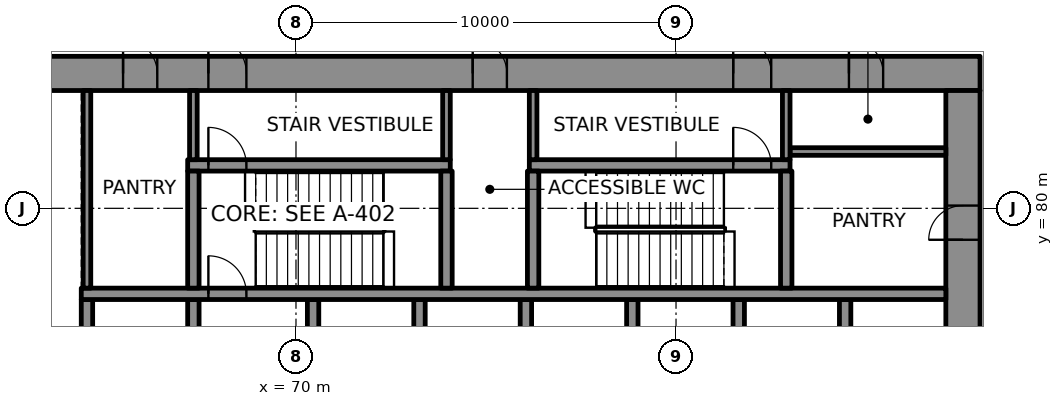
"""IFC4 building model, lengths in metres.
Left out: names, types, materials, properties, quantities, classifications, styles, units other than length and angle.
Written with IfcOpenShell. Run it as: python <this file> out.ifc"""

import sys

from ifc_helpers import new_model, si_unit, direction, frame, frame_2d, origin, place, context, subcontext, project, spatial, rectangle, extrude, element, fill, save


model = new_model("IFC4")
c1 = context("Model", 3, precision=1e-05, world=origin(), true_north=direction((0.0, 1.0)))
c2 = subcontext(c1, "Body", "Model", "MODEL_VIEW")
j1 = project(units=[si_unit("LENGTHUNIT", "METRE"), si_unit("PLANEANGLEUNIT", "RADIAN")], contexts=[c1])
p1 = place(None, origin())
s1 = spatial("IfcSite", under=j1, at=p1, CompositionType="ELEMENT")
p2 = place(p1, origin())
s2 = spatial("IfcBuilding", under=s1, at=p2, CompositionType="ELEMENT")
p3 = place(p2, frame((0.0, 0.0, 21.8)))
s3 = spatial("IfcBuildingStorey", under=s2, at=p3, CompositionType="ELEMENT", Elevation=21.8)
p4 = place(p3, frame((62.0, 83.55, 0.0), z_axis=(0.0, 0.0, 1.0), x_axis=(1.0, 0.0, 0.0)))
e1 = element("IfcWall", 1, at=p4, inside=s3, PredefinedType="SHEAR", context=c2, shape_type="SweptSolid", body=[
    extrude(rectangle(XDim=26.0, YDim=0.9, at=frame_2d((13.0, 0.0))), origin(), (0.0, 0.0, 1.0), 4.3),
])
p5 = place(p4, frame((5.695, 0.0, 0.0)))
e2 = element("IfcOpeningElement", 2, at=p5, cuts=e1, PredefinedType="OPENING", context=c2, shape_type="SweptSolid", body=[
    extrude(rectangle(XDim=1.0, YDim=2.1, at=frame_2d((0.5, 1.05))), frame((0.0, 0.46, 0.0), z_axis=(0.0, -1.0, 0.0), x_axis=(1.0, 0.0, 0.0)), (0.0, 0.0, 1.0), 0.92),
])
p6 = place(p4, frame((19.505, 0.0, 0.0)))
e3 = element("IfcOpeningElement", 3, at=p6, cuts=e1, PredefinedType="OPENING", context=c2, shape_type="SweptSolid", body=[
    extrude(rectangle(XDim=1.0, YDim=2.1, at=frame_2d((0.5, 1.05))), frame((0.0, 0.46, 0.0), z_axis=(0.0, -1.0, 0.0), x_axis=(1.0, 0.0, 0.0)), (0.0, 0.0, 1.0), 0.92),
])
p7 = place(p4, frame((3.45, 0.0, 0.0)))
e4 = element("IfcOpeningElement", 4, at=p7, cuts=e1, PredefinedType="OPENING", context=c2, shape_type="SweptSolid", body=[
    extrude(rectangle(XDim=0.9, YDim=2.1, at=frame_2d((0.45, 1.05))), frame((0.0, 0.46, 0.0), z_axis=(0.0, -1.0, 0.0), x_axis=(1.0, 0.0, 0.0)), (0.0, 0.0, 1.0), 0.92),
])
p8 = place(p4, frame((12.65, 0.0, 0.0)))
e5 = element("IfcOpeningElement", 5, at=p8, cuts=e1, PredefinedType="OPENING", context=c2, shape_type="SweptSolid", body=[
    extrude(rectangle(XDim=0.9, YDim=2.1, at=frame_2d((0.45, 1.05))), frame((0.0, 0.46, 0.0), z_axis=(0.0, -1.0, 0.0), x_axis=(1.0, 0.0, 0.0)), (0.0, 0.0, 1.0), 0.92),
])
p9 = place(p4, frame((22.55, 0.0, 0.0)))
e6 = element("IfcOpeningElement", 6, at=p9, cuts=e1, PredefinedType="OPENING", context=c2, shape_type="SweptSolid", body=[
    extrude(rectangle(XDim=0.9, YDim=2.1, at=frame_2d((0.45, 1.05))), frame((0.0, 0.46, 0.0), z_axis=(0.0, -1.0, 0.0), x_axis=(1.0, 0.0, 0.0)), (0.0, 0.0, 1.0), 0.92),
])
p10 = place(p3, frame((87.55, 66.9, 0.0), z_axis=(0.0, 0.0, 1.0), x_axis=(0.0, 1.0, 0.0)))
e7 = element("IfcWall", 7, at=p10, inside=s3, PredefinedType="SHEAR", context=c2, shape_type="SweptSolid", body=[
    extrude(rectangle(XDim=16.2, YDim=0.9, at=frame_2d((8.1, 0.0))), origin(), (0.0, 0.0, 1.0), 4.3),
])
p11 = place(p10, frame((5.5, 0.0, 0.0)))
e8 = element("IfcOpeningElement", 8, at=p11, cuts=e7, PredefinedType="OPENING", context=c2, shape_type="SweptSolid", body=[
    extrude(rectangle(XDim=1.8, YDim=2.1, at=frame_2d((0.9, 1.05))), frame((0.0, 0.46, 0.0), z_axis=(0.0, -1.0, 0.0), x_axis=(1.0, 0.0, 0.0)), (0.0, 0.0, 1.0), 0.92),
])
p12 = place(p10, frame((12.272, 0.0, 0.0)))
e9 = element("IfcOpeningElement", 9, at=p12, cuts=e7, PredefinedType="OPENING", context=c2, shape_type="SweptSolid", body=[
    extrude(rectangle(XDim=0.9, YDim=2.1, at=frame_2d((0.45, 1.05))), frame((0.0, 0.46, 0.0), z_axis=(0.0, -1.0, 0.0), x_axis=(1.0, 0.0, 0.0)), (0.0, 0.0, 1.0), 0.92),
])
for number, where, z_axis, x_axis in (
    (10, (64.5, 75.0, 0.0), (0.0, 0.0, 1.0), (0.0, 1.0, 0.0)),
    (11, (67.3, 75.0, 0.0), (0.0, 0.0, 1.0), (0.0, 1.0, 0.0)),
):
    element("IfcWall", number, at=place(p3, frame(where, z_axis=z_axis, x_axis=x_axis)), inside=s3, PredefinedType="SHEAR", context=c2, shape_type="SweptSolid", body=[
        extrude(rectangle(XDim=2.6, YDim=0.3, at=frame_2d((1.3, 0.0))), origin(), (0.0, 0.0, 1.0), 4.3),
    ])
p13 = place(p3, frame((70.45, 75.0, 0.0), z_axis=(0.0, 0.0, 1.0), x_axis=(0.0, 1.0, 0.0)))
e12 = element("IfcWall", 12, at=p13, inside=s3, PredefinedType="SHEAR", context=c2, shape_type="SweptSolid", body=[
    extrude(rectangle(XDim=2.6, YDim=0.3, at=frame_2d((1.3, 0.0))), origin(), (0.0, 0.0, 1.0), 4.3),
])
p14 = place(p13, frame((0.15, 0.0, 0.0)))
e13 = element("IfcOpeningElement", 13, at=p14, cuts=e12, PredefinedType="OPENING", context=c2, shape_type="SweptSolid", body=[
    extrude(rectangle(XDim=1.1, YDim=2.1, at=frame_2d((0.55, 1.05))), frame((0.0, 0.16, 0.0), z_axis=(0.0, -1.0, 0.0), x_axis=(1.0, 0.0, 0.0)), (0.0, 0.0, 1.0), 0.32),
])
for number, where, z_axis, x_axis in (
    (14, (73.25, 75.0, 0.0), (0.0, 0.0, 1.0), (0.0, 1.0, 0.0)),
    (15, (76.05, 75.0, 0.0), (0.0, 0.0, 1.0), (0.0, 1.0, 0.0)),
    (16, (78.85, 75.0, 0.0), (0.0, 0.0, 1.0), (0.0, 1.0, 0.0)),
    (17, (81.65, 75.0, 0.0), (0.0, 0.0, 1.0), (0.0, 1.0, 0.0)),
    (18, (84.45, 75.0, 0.0), (0.0, 0.0, 1.0), (0.0, 1.0, 0.0)),
):
    element("IfcWall", number, at=place(p3, frame(where, z_axis=z_axis, x_axis=x_axis)), inside=s3, PredefinedType="SHEAR", context=c2, shape_type="SweptSolid", body=[
        extrude(rectangle(XDim=2.6, YDim=0.3, at=frame_2d((1.3, 0.0))), origin(), (0.0, 0.0, 1.0), 4.3),
    ])
p15 = place(p3, frame((64.35, 77.75, 0.0), z_axis=(0.0, 0.0, 1.0), x_axis=(1.0, 0.0, 0.0)))
e19 = element("IfcWall", 19, at=p15, inside=s3, PredefinedType="SHEAR", context=c2, shape_type="SweptSolid", body=[
    extrude(rectangle(XDim=22.75, YDim=0.3, at=frame_2d((11.375, 0.0))), origin(), (0.0, 0.0, 1.0), 4.3),
])
p16 = place(p15, frame((3.345, 0.0, 0.0)))
e20 = element("IfcOpeningElement", 20, at=p16, cuts=e19, PredefinedType="OPENING", context=c2, shape_type="SweptSolid", body=[
    extrude(rectangle(XDim=1.0, YDim=2.1, at=frame_2d((0.5, 1.05))), frame((0.0, 0.16, 0.0), z_axis=(0.0, -1.0, 0.0), x_axis=(1.0, 0.0, 0.0)), (0.0, 0.0, 1.0), 0.32),
])
p17 = place(p3, frame((67.15, 81.13, 0.0), z_axis=(0.0, 0.0, 1.0), x_axis=(1.0, 0.0, 0.0)))
e21 = element("IfcWall", 21, at=p17, inside=s3, PredefinedType="SHEAR", context=c2, shape_type="SweptSolid", body=[
    extrude(rectangle(XDim=6.91, YDim=0.3, at=frame_2d((3.455, 0.0))), origin(), (0.0, 0.0, 1.0), 4.3),
])
p18 = place(p17, frame((0.545, 0.0, 0.0)))
e22 = element("IfcOpeningElement", 22, at=p18, cuts=e21, PredefinedType="OPENING", context=c2, shape_type="SweptSolid", body=[
    extrude(rectangle(XDim=1.0, YDim=2.1, at=frame_2d((0.5, 1.05))), frame((0.0, 0.16, 0.0), z_axis=(0.0, -1.0, 0.0), x_axis=(1.0, 0.0, 0.0)), (0.0, 0.0, 1.0), 0.32),
])
p19 = place(p3, frame((76.14, 81.13, 0.0), z_axis=(0.0, 0.0, 1.0), x_axis=(1.0, 0.0, 0.0)))
e23 = element("IfcWall", 23, at=p19, inside=s3, PredefinedType="SHEAR", context=c2, shape_type="SweptSolid", body=[
    extrude(rectangle(XDim=6.86, YDim=0.3, at=frame_2d((3.43, 0.0))), origin(), (0.0, 0.0, 1.0), 4.3),
])
p20 = place(p19, frame((5.365, 0.0, 0.0)))
e24 = element("IfcOpeningElement", 24, at=p20, cuts=e23, PredefinedType="OPENING", context=c2, shape_type="SweptSolid", body=[
    extrude(rectangle(XDim=1.0, YDim=2.1, at=frame_2d((0.5, 1.05))), frame((0.0, 0.16, 0.0), z_axis=(0.0, -1.0, 0.0), x_axis=(1.0, 0.0, 0.0)), (0.0, 0.0, 1.0), 0.32),
])
for number, where, z_axis, x_axis in (
    (25, (67.3, 77.9, 0.0), (0.0, 0.0, 1.0), (0.0, 1.0, 0.0)),
    (26, (73.96, 77.9, 0.0), (0.0, 0.0, 1.0), (0.0, 1.0, 0.0)),
    (27, (76.24, 77.9, 0.0), (0.0, 0.0, 1.0), (0.0, 1.0, 0.0)),
    (28, (82.9, 77.9, 0.0), (0.0, 0.0, 1.0), (0.0, 1.0, 0.0)),
):
    element("IfcWall", number, at=place(p3, frame(where, z_axis=z_axis, x_axis=x_axis)), inside=s3, PredefinedType="SHEAR", context=c2, shape_type="SweptSolid", body=[
        extrude(rectangle(XDim=3.08, YDim=0.3, at=frame_2d((1.54, 0.0))), origin(), (0.0, 0.0, 1.0), 4.3),
    ])
p21 = place(p3, frame((83.0, 81.495, 0.0), z_axis=(0.0, 0.0, 1.0), x_axis=(1.0, 0.0, 0.0)))
e29 = element("IfcWall", 29, at=p21, inside=s3, PredefinedType="PARTITIONING", context=c2, shape_type="SweptSolid", body=[
    extrude(rectangle(XDim=4.1, YDim=0.2, at=frame_2d((2.05, 0.0))), origin(), (0.0, 0.0, 1.0), 4.3),
])
p22 = place(p3, frame((64.5, 77.9, 0.0), z_axis=(0.0, 0.0, 1.0), x_axis=(0.0, 1.0, 0.0)))
e30 = element("IfcWall", 30, at=p22, inside=s3, PredefinedType="PARTITIONING", context=c2, shape_type="SweptSolid", body=[
    extrude(rectangle(XDim=5.2, YDim=0.2, at=frame_2d((2.6, 0.0))), origin(), (0.0, 0.0, 1.0), 4.3),
])
for number, where, z_axis, x_axis in (
    (31, (67.3, 81.28, 0.0), (0.0, 0.0, 1.0), (0.0, 1.0, 0.0)),
    (32, (73.96, 81.28, 0.0), (0.0, 0.0, 1.0), (0.0, 1.0, 0.0)),
    (33, (76.24, 81.28, 0.0), (0.0, 0.0, 1.0), (0.0, 1.0, 0.0)),
    (34, (82.9, 81.28, 0.0), (0.0, 0.0, 1.0), (0.0, 1.0, 0.0)),
):
    element("IfcWall", number, at=place(p3, frame(where, z_axis=z_axis, x_axis=x_axis)), inside=s3, PredefinedType="PARTITIONING", context=c2, shape_type="SweptSolid", body=[
        extrude(rectangle(XDim=1.82, YDim=0.2, at=frame_2d((0.91, 0.0))), origin(), (0.0, 0.0, 1.0), 4.3),
    ])
p23 = place(p3, frame((107.106, 62.36, 0.0), z_axis=(0.0, 0.0, 1.0), x_axis=(-0.49999992739, 0.866025445706, 0.0)))
e35 = element("IfcWall", 35, at=p23, inside=s3, PredefinedType="SOLIDWALL", context=c2, shape_type="SweptSolid", body=[
    extrude(rectangle(XDim=54.0, YDim=0.4, at=frame_2d((27.0, 0.0))), origin(), (0.0, 0.0, 1.0), 4.3),
])
p24 = place(p3, frame((112.496, 65.725, 0.0), z_axis=(0.0, 0.0, 1.0), x_axis=(-0.499998673217, 0.866026169802, 0.0)))
e36 = element("IfcWall", 36, at=p24, inside=s3, PredefinedType="PARTITIONING", context=c2, shape_type="SweptSolid", body=[
    extrude(rectangle(XDim=53.48, YDim=0.2, at=frame_2d((26.74, 0.0))), origin(), (0.0, 0.0, 1.0), 4.3),
])
p25 = place(p24, frame((13.08, 0.0, 0.0)))
e37 = element("IfcOpeningElement", 37, at=p25, cuts=e36, PredefinedType="OPENING", context=c2, shape_type="SweptSolid", body=[
    extrude(rectangle(XDim=1.0, YDim=2.1, at=frame_2d((0.5, 1.05))), frame((0.0, 0.11, 0.0), z_axis=(0.0, -1.0, 0.0), x_axis=(1.0, 0.0, 0.0)), (0.0, 0.0, 1.0), 0.22),
])
p26 = place(p24, frame((26.28, 0.0, 0.0)))
e38 = element("IfcOpeningElement", 38, at=p26, cuts=e36, PredefinedType="OPENING", context=c2, shape_type="SweptSolid", body=[
    extrude(rectangle(XDim=1.0, YDim=2.1, at=frame_2d((0.5, 1.05))), frame((0.0, 0.11, 0.0), z_axis=(0.0, -1.0, 0.0), x_axis=(1.0, 0.0, 0.0)), (0.0, 0.0, 1.0), 0.22),
])
p27 = place(p24, frame((43.88, 0.0, 0.0)))
e39 = element("IfcOpeningElement", 39, at=p27, cuts=e36, PredefinedType="OPENING", context=c2, shape_type="SweptSolid", body=[
    extrude(rectangle(XDim=1.0, YDim=2.1, at=frame_2d((0.5, 1.05))), frame((0.0, 0.11, 0.0), z_axis=(0.0, -1.0, 0.0), x_axis=(1.0, 0.0, 0.0)), (0.0, 0.0, 1.0), 0.22),
])
p28 = place(p24, frame((50.58, 0.0, 0.0)))
e40 = element("IfcOpeningElement", 40, at=p28, cuts=e36, PredefinedType="OPENING", context=c2, shape_type="SweptSolid", body=[
    extrude(rectangle(XDim=1.0, YDim=2.1, at=frame_2d((0.5, 1.05))), frame((0.0, 0.11, 0.0), z_axis=(0.0, -1.0, 0.0), x_axis=(1.0, 0.0, 0.0)), (0.0, 0.0, 1.0), 0.22),
])
p29 = place(p16, origin())
e41 = element("IfcDoor", 41, at=p29, inside=s3, OperationType="SINGLE_SWING_LEFT", PredefinedType="DOOR", context=c2, shape_type="SweptSolid", body=[
    extrude(rectangle(XDim=1.0, YDim=2.1, at=frame_2d((0.5, 1.05))), frame((0.0, 0.025, 0.0), z_axis=(0.0, -1.0, 0.0), x_axis=(1.0, 0.0, 0.0)), (0.0, 0.0, 1.0), 0.05),
])
fill(e20, e41)
p30 = place(p18, origin())
e42 = element("IfcDoor", 42, at=p30, inside=s3, OperationType="SINGLE_SWING_RIGHT", PredefinedType="DOOR", context=c2, shape_type="SweptSolid", body=[
    extrude(rectangle(XDim=1.0, YDim=2.1, at=frame_2d((0.5, 1.05))), frame((0.0, 0.025, 0.0), z_axis=(0.0, -1.0, 0.0), x_axis=(1.0, 0.0, 0.0)), (0.0, 0.0, 1.0), 0.05),
])
fill(e22, e42)
p31 = place(p5, origin())
e43 = element("IfcDoor", 43, at=p31, inside=s3, OperationType="SINGLE_SWING_LEFT", PredefinedType="DOOR", context=c2, shape_type="SweptSolid", body=[
    extrude(rectangle(XDim=1.0, YDim=2.1, at=frame_2d((0.5, 1.05))), frame((0.0, 0.17, 0.0), z_axis=(0.0, -1.0, 0.0), x_axis=(1.0, 0.0, 0.0)), (0.0, 0.0, 1.0), 0.34),
])
fill(e2, e43)
p32 = place(p20, origin())
e44 = element("IfcDoor", 44, at=p32, inside=s3, OperationType="SINGLE_SWING_RIGHT", PredefinedType="DOOR", context=c2, shape_type="SweptSolid", body=[
    extrude(rectangle(XDim=1.0, YDim=2.1, at=frame_2d((0.5, 1.05))), frame((0.0, 0.025, 0.0), z_axis=(0.0, -1.0, 0.0), x_axis=(1.0, 0.0, 0.0)), (0.0, 0.0, 1.0), 0.05),
])
fill(e24, e44)
p33 = place(p6, origin())
e45 = element("IfcDoor", 45, at=p33, inside=s3, OperationType="SINGLE_SWING_LEFT", PredefinedType="DOOR", context=c2, shape_type="SweptSolid", body=[
    extrude(rectangle(XDim=1.0, YDim=2.1, at=frame_2d((0.5, 1.05))), frame((0.0, 0.17, 0.0), z_axis=(0.0, -1.0, 0.0), x_axis=(1.0, 0.0, 0.0)), (0.0, 0.0, 1.0), 0.34),
])
fill(e3, e45)
p34 = place(p7, origin())
e46 = element("IfcDoor", 46, at=p34, inside=s3, OperationType="SINGLE_SWING_RIGHT", PredefinedType="DOOR", context=c2, shape_type="SweptSolid", body=[
    extrude(rectangle(XDim=0.9, YDim=2.1, at=frame_2d((0.45, 1.05))), frame((0.0, 0.17, 0.0), z_axis=(0.0, -1.0, 0.0), x_axis=(1.0, 0.0, 0.0)), (0.0, 0.0, 1.0), 0.34),
])
fill(e4, e46)
p35 = place(p8, origin())
e47 = element("IfcDoor", 47, at=p35, inside=s3, OperationType="SINGLE_SWING_LEFT", PredefinedType="DOOR", context=c2, shape_type="SweptSolid", body=[
    extrude(rectangle(XDim=0.9, YDim=2.1, at=frame_2d((0.45, 1.05))), frame((0.0, 0.17, 0.0), z_axis=(0.0, -1.0, 0.0), x_axis=(1.0, 0.0, 0.0)), (0.0, 0.0, 1.0), 0.34),
])
fill(e5, e47)
p36 = place(p12, origin())
e48 = element("IfcDoor", 48, at=p36, inside=s3, OperationType="SINGLE_SWING_RIGHT", PredefinedType="DOOR", context=c2, shape_type="SweptSolid", body=[
    extrude(rectangle(XDim=0.9, YDim=2.1, at=frame_2d((0.45, 1.05))), frame((0.0, 0.17, 0.0), z_axis=(0.0, -1.0, 0.0), x_axis=(1.0, 0.0, 0.0)), (0.0, 0.0, 1.0), 0.34),
])
fill(e9, e48)
p37 = place(p9, origin())
e49 = element("IfcDoor", 49, at=p37, inside=s3, OperationType="SINGLE_SWING_LEFT", PredefinedType="DOOR", context=c2, shape_type="SweptSolid", body=[
    extrude(rectangle(XDim=0.9, YDim=2.1, at=frame_2d((0.45, 1.05))), frame((0.0, 0.17, 0.0), z_axis=(0.0, -1.0, 0.0), x_axis=(1.0, 0.0, 0.0)), (0.0, 0.0, 1.0), 0.34),
])
fill(e6, e49)
save(model, sys.argv[1])
